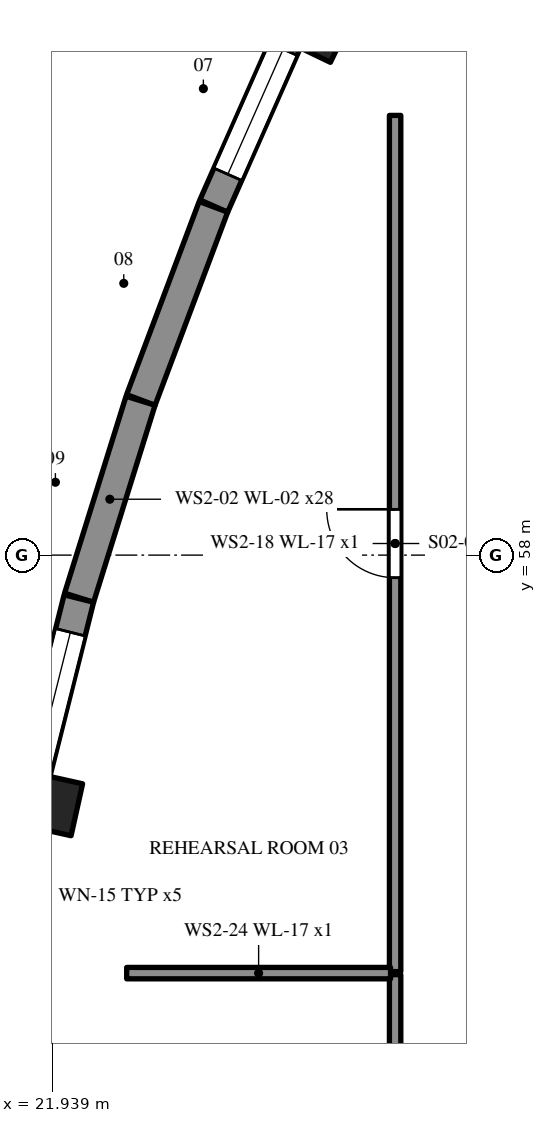
"""IFC4 building model, lengths in metres.
Left out: names, types, materials, properties, quantities, classifications, styles, units other than length and angle.
Written with IfcOpenShell. Run it as: python <this file> out.ifc"""

import sys

from ifc_helpers import new_model, si_unit, direction, frame, frame_2d, origin, origin_2d, place, context, subcontext, project, spatial, polyline, rectangle, outline, extrude, element, fill, save


model = new_model("IFC4")
c1 = context("Model", 3, precision=1e-05, world=origin(), true_north=direction((0.0, 1.0)))
c2 = subcontext(c1, "Body", "Model", "MODEL_VIEW")
j1 = project(units=[si_unit("LENGTHUNIT", "METRE"), si_unit("PLANEANGLEUNIT", "RADIAN")], contexts=[c1])
p1 = place(None, origin())
s1 = spatial("IfcSite", under=j1, at=p1, CompositionType="ELEMENT")
p2 = place(p1, origin())
s2 = spatial("IfcBuilding", under=s1, at=p2, CompositionType="ELEMENT")
p3 = place(p2, frame((0.0, 0.0, 10.2)))
s3 = spatial("IfcBuildingStorey", under=s2, at=p3, CompositionType="ELEMENT", Elevation=10.2)
p4 = place(p3, frame((25.162, 65.075, 0.0), z_axis=(0.0, 0.0, 1.0), x_axis=(-0.404652153757, -0.914470685402, 0.0)))
e1 = element("IfcWall", 1, at=p4, inside=s3, PredefinedType="SOLIDWALL", context=c2, shape_type="SweptSolid", body=[
    extrude(outline(polyline([(0.0, 0.0), (2.714, 0.0), (2.714, 2.917), (2.576, 2.963), (0.197, 3.749), (0.108, 3.778), (0.0, 3.72), (0.0, 0.0)])), frame((0.0, 0.2, 0.0), z_axis=(0.0, -1.0, 0.0), x_axis=(1.0, 0.0, 0.0)), (0.0, 0.0, 1.0), 0.4),
])
p5 = place(p4, frame((0.457, 0.0, 0.9)))
e2 = element("IfcOpeningElement", 2, at=p5, cuts=e1, PredefinedType="OPENING", context=c2, shape_type="SweptSolid", body=[
    extrude(rectangle(XDim=1.8, YDim=1.5, at=frame_2d((0.9, 0.75))), frame((0.0, 0.21, 0.0), z_axis=(0.0, -1.0, 0.0), x_axis=(1.0, 0.0, 0.0)), (0.0, 0.0, 1.0), 0.42),
])
p6 = place(p3, frame((24.06, 62.583, 0.0), z_axis=(0.0, 0.0, 1.0), x_axis=(-0.351862601417, -0.936051659752, 0.0)))
e3 = element("IfcWall", 3, at=p6, inside=s3, PredefinedType="SOLIDWALL", context=c2, shape_type="SweptSolid", body=[
    extrude(outline(polyline([(0.0, 0.0), (2.714, 0.0), (2.714, 2.02), (2.54, 2.077), (0.121, 2.876), (0.0, 2.91), (0.0, 0.0)])), frame((0.0, 0.2, 0.0), z_axis=(0.0, -1.0, 0.0), x_axis=(1.0, 0.0, 0.0)), (0.0, 0.0, 1.0), 0.4),
])
p7 = place(p3, frame((23.101, 60.031, 0.0), z_axis=(0.0, 0.0, 1.0), x_axis=(-0.29795748067, -0.954579142718, 0.0)))
e4 = element("IfcWall", 4, at=p7, inside=s3, PredefinedType="SOLIDWALL", context=c2, shape_type="SweptSolid", body=[
    extrude(outline(polyline([(0.0, 0.0), (2.715, 0.0), (2.714, 2.916), (2.698, 2.911), (0.0, 2.02), (0.0, 0.0)])), frame((0.0, 0.2, 0.0), z_axis=(0.0, -1.0, 0.0), x_axis=(1.0, 0.0, 0.0)), (0.0, 0.0, 1.0), 0.4),
])
p8 = place(p3, frame((22.289, 57.429, 0.0), z_axis=(0.0, 0.0, 1.0), x_axis=(-0.2430011368, -0.970026003525, 0.0)))
e5 = element("IfcWall", 5, at=p8, inside=s3, PredefinedType="SOLIDWALL", context=c2, shape_type="SweptSolid", body=[
    extrude(outline(polyline([(0.0, 0.0), (2.715, 0.0), (2.715, 3.823), (2.687, 3.814), (2.637, 3.797), (2.586, 3.781), (0.0, 2.924), (0.0, 0.0)])), frame((0.0, 0.2, 0.0), z_axis=(0.0, -1.0, 0.0), x_axis=(1.0, 0.0, 0.0)), (0.0, 0.0, 1.0), 0.4),
])
p9 = place(p8, frame((0.458, 0.0, 0.9)))
e6 = element("IfcOpeningElement", 6, at=p9, cuts=e5, PredefinedType="OPENING", context=c2, shape_type="SweptSolid", body=[
    extrude(rectangle(XDim=1.8, YDim=1.5, at=frame_2d((0.9, 0.75))), frame((0.0, 0.21, 0.0), z_axis=(0.0, -1.0, 0.0), x_axis=(1.0, 0.0, 0.0)), (0.0, 0.0, 1.0), 0.42),
])
p10 = place(p3, frame((22.043, 54.698, 0.0), z_axis=(0.0, 0.0, 1.0), x_axis=(-0.216640755448, -0.976251393381, 0.0)))
e7 = element("IfcColumn", 7, at=p10, inside=s3, PredefinedType="PILASTER", context=c2, shape_type="SweptSolid", body=[
    extrude(rectangle(XDim=0.7, YDim=0.45, at=origin_2d()), origin(), (0.0, 0.0, 1.0), 3.953),
])
p11 = place(p3, frame((25.548, 64.896, 0.0), z_axis=(0.0, 0.0, 1.0), x_axis=(-0.433813735983, -0.901002576285, 0.0)))
e8 = element("IfcColumn", 8, at=p11, inside=s3, PredefinedType="PILASTER", context=c2, shape_type="SweptSolid", body=[
    extrude(rectangle(XDim=0.7, YDim=0.45, at=origin_2d()), origin(), (0.0, 0.0, 1.0), 3.95),
])
p12 = place(p3, frame((26.45, 38.52, 0.0), z_axis=(0.0, 0.0, 1.0), x_axis=(0.0, 1.0, 0.0)))
e9 = element("IfcWall", 9, at=p12, inside=s3, PredefinedType="PARTITIONING", context=c2, shape_type="SweptSolid", body=[
    extrude(rectangle(XDim=13.96, YDim=0.15, at=frame_2d((6.98, 0.0))), origin(), (0.0, 0.0, 1.0), 2.4),
])
p13 = place(p12, frame((6.53, 0.0, 0.0)))
e10 = element("IfcOpeningElement", 10, at=p13, cuts=e9, PredefinedType="OPENING", context=c2, shape_type="SweptSolid", body=[
    extrude(rectangle(XDim=0.9, YDim=2.1, at=frame_2d((0.45, 1.05))), frame((0.0, 0.085, 0.0), z_axis=(0.0, -1.0, 0.0), x_axis=(1.0, 0.0, 0.0)), (0.0, 0.0, 1.0), 0.17),
])
p14 = place(p3, frame((26.45, 52.52, 0.0), z_axis=(0.0, 0.0, 1.0), x_axis=(0.0, 1.0, 0.0)))
e11 = element("IfcWall", 11, at=p14, inside=s3, PredefinedType="PARTITIONING", context=c2, shape_type="SweptSolid", body=[
    extrude(rectangle(XDim=11.265, YDim=0.15, at=frame_2d((5.633, 0.0))), origin(), (0.0, 0.0, 1.0), 2.4),
])
p15 = place(p14, frame((5.183, 0.0, 0.0)))
e12 = element("IfcOpeningElement", 12, at=p15, cuts=e11, PredefinedType="OPENING", context=c2, shape_type="SweptSolid", body=[
    extrude(rectangle(XDim=0.9, YDim=2.1, at=frame_2d((0.45, 1.05))), frame((0.0, 0.085, 0.0), z_axis=(0.0, -1.0, 0.0), x_axis=(1.0, 0.0, 0.0)), (0.0, 0.0, 1.0), 0.17),
])
p16 = place(p3, frame((22.918, 52.5, 0.0), z_axis=(0.0, 0.0, 1.0), x_axis=(1.0, 0.0, 0.0)))
e13 = element("IfcWall", 13, at=p16, inside=s3, PredefinedType="PARTITIONING", context=c2, shape_type="SweptSolid", body=[
    extrude(rectangle(XDim=3.471, YDim=0.15, at=frame_2d((1.736, 0.0))), origin(), (0.0, 0.0, 1.0), 2.4),
])
p17 = place(p5, origin())
e14 = element("IfcWindow", 14, at=p17, inside=s3, PartitioningType="SINGLE_PANEL", PredefinedType="WINDOW", context=c2, shape_type="SweptSolid", body=[
    extrude(rectangle(XDim=1.8, YDim=1.5, at=frame_2d((0.9, 0.75))), frame((0.0, 0.03, 0.0), z_axis=(0.0, -1.0, 0.0), x_axis=(1.0, 0.0, 0.0)), (0.0, 0.0, 1.0), 0.06),
])
fill(e2, e14)
p18 = place(p9, origin())
e15 = element("IfcWindow", 15, at=p18, inside=s3, PartitioningType="SINGLE_PANEL", PredefinedType="WINDOW", context=c2, shape_type="SweptSolid", body=[
    extrude(rectangle(XDim=1.8, YDim=1.5, at=frame_2d((0.9, 0.75))), frame((0.0, 0.03, 0.0), z_axis=(0.0, -1.0, 0.0), x_axis=(1.0, 0.0, 0.0)), (0.0, 0.0, 1.0), 0.06),
])
fill(e6, e15)
p19 = place(p15, origin())
e16 = element("IfcDoor", 16, at=p19, inside=s3, OperationType="SINGLE_SWING_RIGHT", PredefinedType="DOOR", context=c2, shape_type="SweptSolid", body=[
    extrude(rectangle(XDim=0.9, YDim=2.1, at=frame_2d((0.45, 1.05))), frame((0.0, 0.025, 0.0), z_axis=(0.0, -1.0, 0.0), x_axis=(1.0, 0.0, 0.0)), (0.0, 0.0, 1.0), 0.05),
])
fill(e12, e16)
save(model, sys.argv[1])
